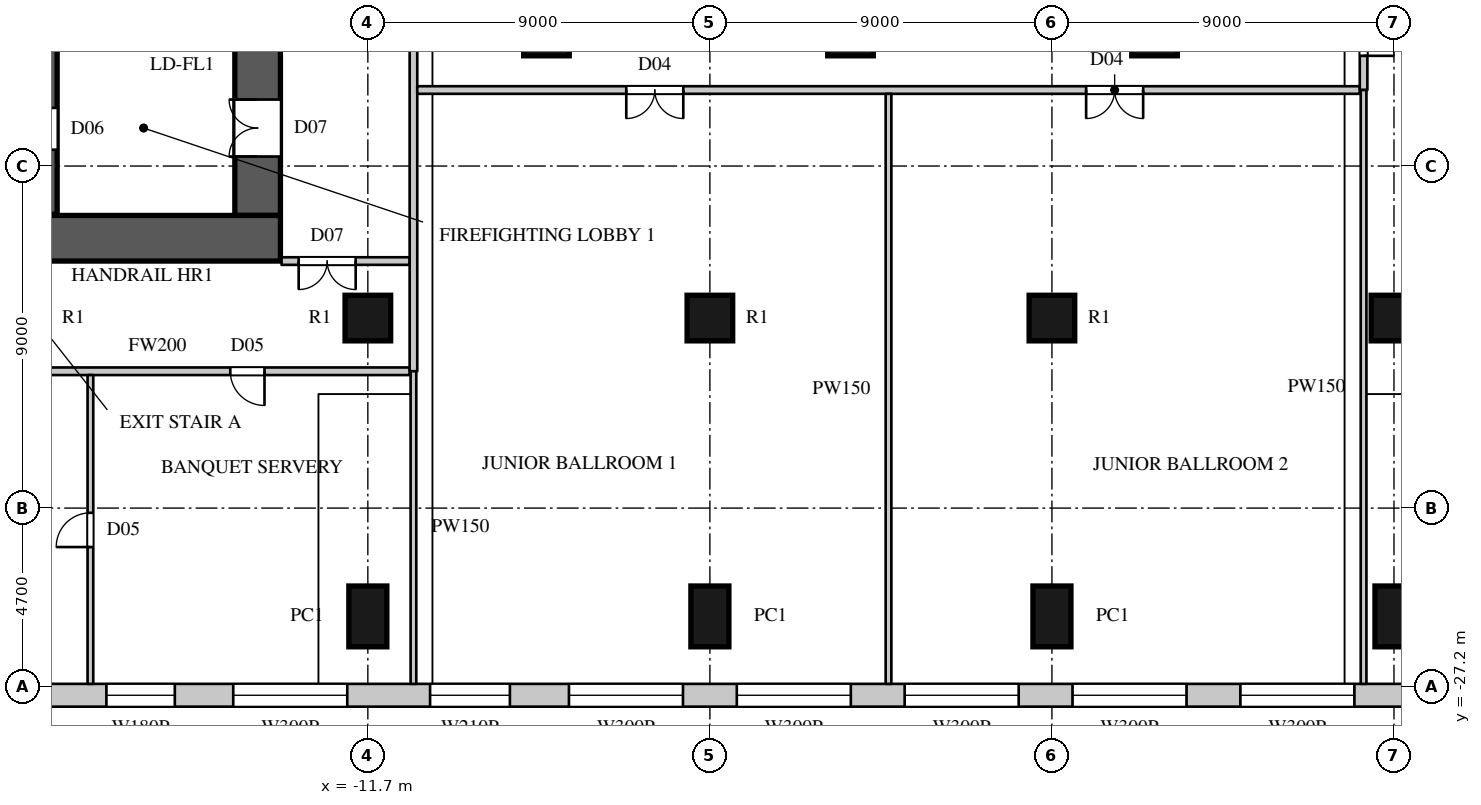
"""IFC4 building model, lengths in metres.
Left out: names, types, materials, properties, quantities, classifications, styles, units other than length and angle.
Written with IfcOpenShell. Run it as: python <this file> out.ifc"""

import sys

from ifc_helpers import new_model, si_unit, direction, frame, frame_2d, origin, origin_2d, place, context, subcontext, project, spatial, rectangle, circle, extrude, element, fill, save


model = new_model("IFC4")
c1 = context("Model", 3, precision=1e-05, world=origin(), true_north=direction((0.0, 1.0)))
c2 = subcontext(c1, "Body", "Model", "MODEL_VIEW")
j1 = project(units=[si_unit("LENGTHUNIT", "METRE"), si_unit("PLANEANGLEUNIT", "RADIAN")], contexts=[c1])
p1 = place(None, origin())
s1 = spatial("IfcSite", under=j1, at=p1, CompositionType="ELEMENT")
p2 = place(p1, origin())
s2 = spatial("IfcBuilding", under=s1, at=p2, CompositionType="ELEMENT")
p3 = place(p2, frame((0.0, 0.0, 36.0)))
s3 = spatial("IfcBuildingStorey", under=s2, at=p3, CompositionType="ELEMENT", Elevation=36.0)
for number, where, z_axis, x_axis in (
    (1, (-11.7, -25.35, 0.0), (0.0, 0.0, 1.0), (1.0, 0.0, 0.0)),
    (2, (-2.7, -25.35, 0.0), (0.0, 0.0, 1.0), (1.0, 0.0, 0.0)),
    (3, (6.3, -25.35, 0.0), (0.0, 0.0, 1.0), (1.0, 0.0, 0.0)),
    (4, (15.3, -25.35, 0.0), (0.0, 0.0, 1.0), (1.0, 0.0, 0.0)),
):
    element("IfcColumn", number, at=place(p3, frame(where, z_axis=z_axis, x_axis=x_axis)), inside=s3, PredefinedType="COLUMN", context=c2, shape_type="SweptSolid", body=[
        extrude(rectangle(XDim=1.0, YDim=1.6, at=origin_2d()), origin(), (0.0, 0.0, 1.0), 8.0),
    ])
for number, where, z_axis, x_axis in (
    (5, (-11.7, -17.5, 0.0), (0.0, 0.0, 1.0), (1.0, 0.0, 0.0)),
    (6, (-2.7, -17.5, 0.0), (0.0, 0.0, 1.0), (1.0, 0.0, 0.0)),
    (7, (6.3, -17.5, 0.0), (0.0, 0.0, 1.0), (1.0, 0.0, 0.0)),
    (8, (15.3, -17.5, 0.0), (0.0, 0.0, 1.0), (1.0, 0.0, 0.0)),
    (9, (-7.0, -10.0, 0.0), (0.0, 0.0, 1.0), (1.0, 0.0, 0.0)),
    (10, (1.0, -10.0, 0.0), (0.0, 0.0, 1.0), (1.0, 0.0, 0.0)),
    (11, (9.0, -10.0, 0.0), (0.0, 0.0, 1.0), (1.0, 0.0, 0.0)),
):
    element("IfcColumn", number, at=place(p3, frame(where, z_axis=z_axis, x_axis=x_axis)), inside=s3, PredefinedType="COLUMN", context=c2, shape_type="SweptSolid", body=[
        extrude(circle(Radius=0.6, at=origin_2d()), origin(), (0.0, 0.0, 1.0), 8.0),
    ])
p4 = place(p3, frame((-29.2, -27.425, 0.0), z_axis=(0.0, 0.0, 1.0), x_axis=(1.0, 0.0, 0.0)))
e12 = element("IfcWall", 12, at=p4, inside=s3, PredefinedType="ELEMENTEDWALL", context=c2, shape_type="SweptSolid", body=[
    extrude(rectangle(XDim=53.0, YDim=0.6, at=frame_2d((26.5, 0.0))), origin(), (0.0, 0.0, 1.0), 7.6),
])
p5 = place(p4, frame((0.708, 0.0, 1.5)))
e13 = element("IfcOpeningElement", 13, at=p5, cuts=e12, PredefinedType="OPENING", context=c2, shape_type="SweptSolid", body=[
    extrude(rectangle(XDim=3.0, YDim=2.4, at=frame_2d((1.5, 1.2))), frame((0.0, 0.31, 0.0), z_axis=(0.0, -1.0, 0.0), x_axis=(1.0, 0.0, 0.0)), (0.0, 0.0, 1.0), 0.62),
])
p6 = place(p4, frame((5.125, 0.0, 1.5)))
e14 = element("IfcOpeningElement", 14, at=p6, cuts=e12, PredefinedType="OPENING", context=c2, shape_type="SweptSolid", body=[
    extrude(rectangle(XDim=3.0, YDim=2.4, at=frame_2d((1.5, 1.2))), frame((0.0, 0.31, 0.0), z_axis=(0.0, -1.0, 0.0), x_axis=(1.0, 0.0, 0.0)), (0.0, 0.0, 1.0), 0.62),
])
p7 = place(p4, frame((13.958, 0.0, 1.5)))
e15 = element("IfcOpeningElement", 15, at=p7, cuts=e12, PredefinedType="OPENING", context=c2, shape_type="SweptSolid", body=[
    extrude(rectangle(XDim=3.0, YDim=2.4, at=frame_2d((1.5, 1.2))), frame((0.0, 0.31, 0.0), z_axis=(0.0, -1.0, 0.0), x_axis=(1.0, 0.0, 0.0)), (0.0, 0.0, 1.0), 0.62),
])
p8 = place(p4, frame((22.792, 0.0, 1.5)))
e16 = element("IfcOpeningElement", 16, at=p8, cuts=e12, PredefinedType="OPENING", context=c2, shape_type="SweptSolid", body=[
    extrude(rectangle(XDim=3.0, YDim=2.4, at=frame_2d((1.5, 1.2))), frame((0.0, 0.31, 0.0), z_axis=(0.0, -1.0, 0.0), x_axis=(1.0, 0.0, 0.0)), (0.0, 0.0, 1.0), 0.62),
])
p9 = place(p4, frame((27.208, 0.0, 1.5)))
e17 = element("IfcOpeningElement", 17, at=p9, cuts=e12, PredefinedType="OPENING", context=c2, shape_type="SweptSolid", body=[
    extrude(rectangle(XDim=3.0, YDim=2.4, at=frame_2d((1.5, 1.2))), frame((0.0, 0.31, 0.0), z_axis=(0.0, -1.0, 0.0), x_axis=(1.0, 0.0, 0.0)), (0.0, 0.0, 1.0), 0.62),
])
p10 = place(p4, frame((31.625, 0.0, 1.5)))
e18 = element("IfcOpeningElement", 18, at=p10, cuts=e12, PredefinedType="OPENING", context=c2, shape_type="SweptSolid", body=[
    extrude(rectangle(XDim=3.0, YDim=2.4, at=frame_2d((1.5, 1.2))), frame((0.0, 0.31, 0.0), z_axis=(0.0, -1.0, 0.0), x_axis=(1.0, 0.0, 0.0)), (0.0, 0.0, 1.0), 0.62),
])
p11 = place(p4, frame((36.042, 0.0, 1.5)))
e19 = element("IfcOpeningElement", 19, at=p11, cuts=e12, PredefinedType="OPENING", context=c2, shape_type="SweptSolid", body=[
    extrude(rectangle(XDim=3.0, YDim=2.4, at=frame_2d((1.5, 1.2))), frame((0.0, 0.31, 0.0), z_axis=(0.0, -1.0, 0.0), x_axis=(1.0, 0.0, 0.0)), (0.0, 0.0, 1.0), 0.62),
])
p12 = place(p4, frame((40.458, 0.0, 1.5)))
e20 = element("IfcOpeningElement", 20, at=p12, cuts=e12, PredefinedType="OPENING", context=c2, shape_type="SweptSolid", body=[
    extrude(rectangle(XDim=3.0, YDim=2.4, at=frame_2d((1.5, 1.2))), frame((0.0, 0.31, 0.0), z_axis=(0.0, -1.0, 0.0), x_axis=(1.0, 0.0, 0.0)), (0.0, 0.0, 1.0), 0.62),
])
p13 = place(p4, frame((44.875, 0.0, 1.5)))
e21 = element("IfcOpeningElement", 21, at=p13, cuts=e12, PredefinedType="OPENING", context=c2, shape_type="SweptSolid", body=[
    extrude(rectangle(XDim=3.0, YDim=2.4, at=frame_2d((1.5, 1.2))), frame((0.0, 0.31, 0.0), z_axis=(0.0, -1.0, 0.0), x_axis=(1.0, 0.0, 0.0)), (0.0, 0.0, 1.0), 0.62),
])
p14 = place(p4, frame((49.292, 0.0, 1.5)))
e22 = element("IfcOpeningElement", 22, at=p14, cuts=e12, PredefinedType="OPENING", context=c2, shape_type="SweptSolid", body=[
    extrude(rectangle(XDim=3.0, YDim=2.4, at=frame_2d((1.5, 1.2))), frame((0.0, 0.31, 0.0), z_axis=(0.0, -1.0, 0.0), x_axis=(1.0, 0.0, 0.0)), (0.0, 0.0, 1.0), 0.62),
])
p15 = place(p4, frame((10.621, 0.0, 1.5)))
e23 = element("IfcOpeningElement", 23, at=p15, cuts=e12, PredefinedType="OPENING", context=c2, shape_type="SweptSolid", body=[
    extrude(rectangle(XDim=1.8, YDim=2.4, at=frame_2d((0.9, 1.2))), frame((0.0, 0.31, 0.0), z_axis=(0.0, -1.0, 0.0), x_axis=(1.0, 0.0, 0.0)), (0.0, 0.0, 1.0), 0.62),
])
p16 = place(p4, frame((19.137, 0.0, 1.5)))
e24 = element("IfcOpeningElement", 24, at=p16, cuts=e12, PredefinedType="OPENING", context=c2, shape_type="SweptSolid", body=[
    extrude(rectangle(XDim=2.1, YDim=2.4, at=frame_2d((1.05, 1.2))), frame((0.0, 0.31, 0.0), z_axis=(0.0, -1.0, 0.0), x_axis=(1.0, 0.0, 0.0)), (0.0, 0.0, 1.0), 0.62),
])
p17 = place(p3, frame((-30.0, -15.4, 0.0), z_axis=(0.0, 0.0, 1.0), x_axis=(1.0, 0.0, 0.0)))
e25 = element("IfcWall", 25, at=p17, inside=s3, PredefinedType="SHEAR", context=c2, shape_type="SweptSolid", body=[
    extrude(rectangle(XDim=16.0, YDim=1.2, at=frame_2d((8.0, 0.0))), origin(), (0.0, 0.0, 1.0), 8.0),
])
p18 = place(p3, frame((-14.6, -14.8, 0.0), z_axis=(0.0, 0.0, 1.0), x_axis=(0.0, 1.0, 0.0)))
e26 = element("IfcWall", 26, at=p18, inside=s3, PredefinedType="SHEAR", context=c2, shape_type="SweptSolid", body=[
    extrude(rectangle(XDim=29.6, YDim=1.2, at=frame_2d((14.8, 0.0))), origin(), (0.0, 0.0, 1.0), 8.0),
])
p19 = place(p18, frame((1.55, 0.0, 0.0)))
e27 = element("IfcOpeningElement", 27, at=p19, cuts=e26, PredefinedType="OPENING", context=c2, shape_type="SweptSolid", body=[
    extrude(rectangle(XDim=1.5, YDim=2.4, at=frame_2d((0.75, 1.2))), frame((0.0, 0.61, 0.0), z_axis=(0.0, -1.0, 0.0), x_axis=(1.0, 0.0, 0.0)), (0.0, 0.0, 1.0), 1.22),
])
p20 = place(p18, frame((26.55, 0.0, 0.0)))
e28 = element("IfcOpeningElement", 28, at=p20, cuts=e26, PredefinedType="OPENING", context=c2, shape_type="SweptSolid", body=[
    extrude(rectangle(XDim=1.5, YDim=2.4, at=frame_2d((0.75, 1.2))), frame((0.0, 0.61, 0.0), z_axis=(0.0, -1.0, 0.0), x_axis=(1.0, 0.0, 0.0)), (0.0, 0.0, 1.0), 1.22),
])
p21 = place(p18, frame((8.45, 0.0, 0.0)))
e29 = element("IfcOpeningElement", 29, at=p21, cuts=e26, PredefinedType="OPENING", context=c2, shape_type="SweptSolid", body=[
    extrude(rectangle(XDim=1.5, YDim=2.4, at=frame_2d((0.75, 1.2))), frame((0.0, 0.61, 0.0), z_axis=(0.0, -1.0, 0.0), x_axis=(1.0, 0.0, 0.0)), (0.0, 0.0, 1.0), 1.22),
])
p22 = place(p18, frame((19.65, 0.0, 0.0)))
e30 = element("IfcOpeningElement", 30, at=p22, cuts=e26, PredefinedType="OPENING", context=c2, shape_type="SweptSolid", body=[
    extrude(rectangle(XDim=1.5, YDim=2.4, at=frame_2d((0.75, 1.2))), frame((0.0, 0.61, 0.0), z_axis=(0.0, -1.0, 0.0), x_axis=(1.0, 0.0, 0.0)), (0.0, 0.0, 1.0), 1.22),
])
p23 = place(p18, frame((14.5, 0.0, 0.0)))
e31 = element("IfcOpeningElement", 31, at=p23, cuts=e26, PredefinedType="OPENING", context=c2, shape_type="SweptSolid", body=[
    extrude(rectangle(XDim=0.6, YDim=2.0, at=frame_2d((0.3, 1.0))), frame((0.0, 0.61, 0.0), z_axis=(0.0, -1.0, 0.0), x_axis=(1.0, 0.0, 0.0)), (0.0, 0.0, 1.0), 1.22),
])
p24 = place(p3, frame((-23.869, -18.9, 0.0), z_axis=(0.0, 0.0, 1.0), x_axis=(1.0, 0.0, 0.0)))
e32 = element("IfcWall", 32, at=p24, inside=s3, PredefinedType="PARTITIONING", context=c2, shape_type="SweptSolid", body=[
    extrude(rectangle(XDim=13.269, YDim=0.2, at=frame_2d((6.635, 0.0))), origin(), (0.0, 0.0, 1.0), 7.598),
])
p25 = place(p24, frame((8.55, 0.0, 0.0)))
e33 = element("IfcOpeningElement", 33, at=p25, cuts=e32, PredefinedType="OPENING", context=c2, shape_type="SweptSolid", body=[
    extrude(rectangle(XDim=0.9, YDim=2.2, at=frame_2d((0.45, 1.1))), frame((0.0, 0.11, 0.0), z_axis=(0.0, -1.0, 0.0), x_axis=(1.0, 0.0, 0.0)), (0.0, 0.0, 1.0), 0.22),
])
p26 = place(p3, frame((-13.97, -16.0, 0.0), z_axis=(0.0, 0.0, 1.0), x_axis=(1.0, 0.0, 0.0)))
e34 = element("IfcWall", 34, at=p26, inside=s3, PredefinedType="PARTITIONING", context=c2, shape_type="SweptSolid", body=[
    extrude(rectangle(XDim=3.37, YDim=0.2, at=frame_2d((1.685, 0.0))), origin(), (0.0, 0.0, 1.0), 7.598),
])
p27 = place(p26, frame((0.45, 0.0, 0.0)))
e35 = element("IfcOpeningElement", 35, at=p27, cuts=e34, PredefinedType="OPENING", context=c2, shape_type="SweptSolid", body=[
    extrude(rectangle(XDim=1.5, YDim=2.4, at=frame_2d((0.75, 1.2))), frame((0.0, 0.11, 0.0), z_axis=(0.0, -1.0, 0.0), x_axis=(1.0, 0.0, 0.0)), (0.0, 0.0, 1.0), 0.22),
])
p28 = place(p3, frame((-10.5, -18.9, 0.0), z_axis=(0.0, 0.0, 1.0), x_axis=(0.0, 1.0, 0.0)))
e36 = element("IfcWall", 36, at=p28, inside=s3, PredefinedType="PARTITIONING", context=c2, shape_type="SweptSolid", body=[
    extrude(rectangle(XDim=37.8, YDim=0.2, at=frame_2d((18.9, 0.0))), origin(), (0.0, 0.0, 1.0), 7.598),
])
p29 = place(p28, frame((18.15, 0.0, 0.0)))
e37 = element("IfcOpeningElement", 37, at=p29, cuts=e36, PredefinedType="OPENING", context=c2, shape_type="SweptSolid", body=[
    extrude(rectangle(XDim=1.5, YDim=2.4, at=frame_2d((0.75, 1.2))), frame((0.0, 0.11, 0.0), z_axis=(0.0, -1.0, 0.0), x_axis=(1.0, 0.0, 0.0)), (0.0, 0.0, 1.0), 0.22),
])
p30 = place(p3, frame((-10.4, -11.5, 0.0), z_axis=(0.0, 0.0, 1.0), x_axis=(1.0, 0.0, 0.0)))
e38 = element("IfcWall", 38, at=p30, inside=s3, PredefinedType="PARTITIONING", context=c2, shape_type="SweptSolid", body=[
    extrude(rectangle(XDim=24.8, YDim=0.2, at=frame_2d((12.4, 0.0))), origin(), (0.0, 0.0, 1.0), 7.598),
])
p31 = place(p30, frame((5.5, 0.0, 0.0)))
e39 = element("IfcOpeningElement", 39, at=p31, cuts=e38, PredefinedType="OPENING", context=c2, shape_type="SweptSolid", body=[
    extrude(rectangle(XDim=1.5, YDim=2.2, at=frame_2d((0.75, 1.1))), frame((0.0, 0.11, 0.0), z_axis=(0.0, -1.0, 0.0), x_axis=(1.0, 0.0, 0.0)), (0.0, 0.0, 1.0), 0.22),
])
p32 = place(p30, frame((17.6, 0.0, 0.0)))
e40 = element("IfcOpeningElement", 40, at=p32, cuts=e38, PredefinedType="OPENING", context=c2, shape_type="SweptSolid", body=[
    extrude(rectangle(XDim=1.5, YDim=2.2, at=frame_2d((0.75, 1.1))), frame((0.0, 0.11, 0.0), z_axis=(0.0, -1.0, 0.0), x_axis=(1.0, 0.0, 0.0)), (0.0, 0.0, 1.0), 0.22),
])
p33 = place(p3, frame((14.5, -11.5, 0.0), z_axis=(0.0, 0.0, 1.0), x_axis=(0.0, 1.0, 0.0)))
e41 = element("IfcWall", 41, at=p33, inside=s3, PredefinedType="PARTITIONING", context=c2, shape_type="SweptSolid", body=[
    extrude(rectangle(XDim=3.4, YDim=0.2, at=frame_2d((1.7, 0.0))), origin(), (0.0, 0.0, 1.0), 7.598),
])
p34 = place(p33, frame((0.9, 0.0, 0.0)))
e42 = element("IfcOpeningElement", 42, at=p34, cuts=e41, PredefinedType="OPENING", context=c2, shape_type="SweptSolid", body=[
    extrude(rectangle(XDim=1.6, YDim=2.4, at=frame_2d((0.8, 1.2))), frame((0.0, 0.11, 0.0), z_axis=(0.0, -1.0, 0.0), x_axis=(1.0, 0.0, 0.0)), (0.0, 0.0, 1.0), 0.22),
])
p35 = place(p3, frame((-19.0, -27.125, 0.0), z_axis=(0.0, 0.0, 1.0), x_axis=(0.0, 1.0, 0.0)))
e43 = element("IfcWall", 43, at=p35, inside=s3, PredefinedType="PARTITIONING", context=c2, shape_type="SweptSolid", body=[
    extrude(rectangle(XDim=8.125, YDim=0.15, at=frame_2d((4.062, 0.0))), origin(), (0.0, 0.0, 1.0), 7.598),
])
p36 = place(p35, frame((3.6, 0.0, 0.0)))
e44 = element("IfcOpeningElement", 44, at=p36, cuts=e43, PredefinedType="OPENING", context=c2, shape_type="SweptSolid", body=[
    extrude(rectangle(XDim=0.9, YDim=2.2, at=frame_2d((0.45, 1.1))), frame((0.0, 0.085, 0.0), z_axis=(0.0, -1.0, 0.0), x_axis=(1.0, 0.0, 0.0)), (0.0, 0.0, 1.0), 0.17),
])
p37 = place(p3, frame((-10.5, -27.125, 0.0), z_axis=(0.0, 0.0, 1.0), x_axis=(0.0, 1.0, 0.0)))
e45 = element("IfcWall", 45, at=p37, inside=s3, PredefinedType="PARTITIONING", context=c2, shape_type="SweptSolid", body=[
    extrude(rectangle(XDim=8.225, YDim=0.15, at=frame_2d((4.113, 0.0))), origin(), (0.0, 0.0, 1.0), 7.598),
])
p38 = place(p3, frame((2.0, -27.125, 0.0), z_axis=(0.0, 0.0, 1.0), x_axis=(0.0, 1.0, 0.0)))
e46 = element("IfcWall", 46, at=p38, inside=s3, PredefinedType="PARTITIONING", context=c2, shape_type="SweptSolid", body=[
    extrude(rectangle(XDim=15.525, YDim=0.15, at=frame_2d((7.762, 0.0))), origin(), (0.0, 0.0, 1.0), 7.598),
])
p39 = place(p3, frame((14.5, -27.125, 0.0), z_axis=(0.0, 0.0, 1.0), x_axis=(0.0, 1.0, 0.0)))
e47 = element("IfcWall", 47, at=p39, inside=s3, PredefinedType="PARTITIONING", context=c2, shape_type="SweptSolid", body=[
    extrude(rectangle(XDim=15.625, YDim=0.15, at=frame_2d((7.812, 0.0))), origin(), (0.0, 0.0, 1.0), 7.598),
])
p40 = place(p3, frame((-20.0, -14.77, 0.0), z_axis=(0.0, 0.0, 1.0), x_axis=(0.0, 1.0, 0.0)))
e48 = element("IfcWall", 48, at=p40, inside=s3, PredefinedType="SHEAR", context=c2, shape_type="SweptSolid", body=[
    extrude(rectangle(XDim=4.445, YDim=0.25, at=frame_2d((2.223, 0.0))), origin(), (0.0, 0.0, 1.0), 7.598),
])
p41 = place(p40, frame((1.7, 0.0, 0.0)))
e49 = element("IfcOpeningElement", 49, at=p41, cuts=e48, PredefinedType="OPENING", context=c2, shape_type="SweptSolid", body=[
    extrude(rectangle(XDim=1.1, YDim=2.2, at=frame_2d((0.55, 1.1))), frame((0.0, 0.135, 0.0), z_axis=(0.0, -1.0, 0.0), x_axis=(1.0, 0.0, 0.0)), (0.0, 0.0, 1.0), 0.27),
])
p42 = place(p7, origin())
e50 = element("IfcWindow", 50, at=p42, inside=s3, PartitioningType="SINGLE_PANEL", PredefinedType="WINDOW", context=c2, shape_type="SweptSolid", body=[
    extrude(rectangle(XDim=3.0, YDim=2.4, at=frame_2d((1.5, 1.2))), frame((0.0, 0.06, 0.0), z_axis=(0.0, -1.0, 0.0), x_axis=(1.0, 0.0, 0.0)), (0.0, 0.0, 1.0), 0.06),
])
fill(e15, e50)
p43 = place(p8, origin())
e51 = element("IfcWindow", 51, at=p43, inside=s3, PartitioningType="SINGLE_PANEL", PredefinedType="WINDOW", context=c2, shape_type="SweptSolid", body=[
    extrude(rectangle(XDim=3.0, YDim=2.4, at=frame_2d((1.5, 1.2))), frame((0.0, 0.06, 0.0), z_axis=(0.0, -1.0, 0.0), x_axis=(1.0, 0.0, 0.0)), (0.0, 0.0, 1.0), 0.06),
])
fill(e16, e51)
p44 = place(p9, origin())
e52 = element("IfcWindow", 52, at=p44, inside=s3, PartitioningType="SINGLE_PANEL", PredefinedType="WINDOW", context=c2, shape_type="SweptSolid", body=[
    extrude(rectangle(XDim=3.0, YDim=2.4, at=frame_2d((1.5, 1.2))), frame((0.0, 0.06, 0.0), z_axis=(0.0, -1.0, 0.0), x_axis=(1.0, 0.0, 0.0)), (0.0, 0.0, 1.0), 0.06),
])
fill(e17, e52)
p45 = place(p10, origin())
e53 = element("IfcWindow", 53, at=p45, inside=s3, PartitioningType="SINGLE_PANEL", PredefinedType="WINDOW", context=c2, shape_type="SweptSolid", body=[
    extrude(rectangle(XDim=3.0, YDim=2.4, at=frame_2d((1.5, 1.2))), frame((0.0, 0.06, 0.0), z_axis=(0.0, -1.0, 0.0), x_axis=(1.0, 0.0, 0.0)), (0.0, 0.0, 1.0), 0.06),
])
fill(e18, e53)
p46 = place(p11, origin())
e54 = element("IfcWindow", 54, at=p46, inside=s3, PartitioningType="SINGLE_PANEL", PredefinedType="WINDOW", context=c2, shape_type="SweptSolid", body=[
    extrude(rectangle(XDim=3.0, YDim=2.4, at=frame_2d((1.5, 1.2))), frame((0.0, 0.06, 0.0), z_axis=(0.0, -1.0, 0.0), x_axis=(1.0, 0.0, 0.0)), (0.0, 0.0, 1.0), 0.06),
])
fill(e19, e54)
p47 = place(p12, origin())
e55 = element("IfcWindow", 55, at=p47, inside=s3, PartitioningType="SINGLE_PANEL", PredefinedType="WINDOW", context=c2, shape_type="SweptSolid", body=[
    extrude(rectangle(XDim=3.0, YDim=2.4, at=frame_2d((1.5, 1.2))), frame((0.0, 0.06, 0.0), z_axis=(0.0, -1.0, 0.0), x_axis=(1.0, 0.0, 0.0)), (0.0, 0.0, 1.0), 0.06),
])
fill(e20, e55)
p48 = place(p41, origin())
e56 = element("IfcDoor", 56, at=p48, inside=s3, OperationType="SINGLE_SWING_RIGHT", PredefinedType="DOOR", context=c2, shape_type="SweptSolid", body=[
    extrude(rectangle(XDim=1.1, YDim=2.2, at=frame_2d((0.55, 1.1))), frame((0.0, 0.025, 0.0), z_axis=(0.0, -1.0, 0.0), x_axis=(1.0, 0.0, 0.0)), (0.0, 0.0, 1.0), 0.05),
])
fill(e49, e56)
p49 = place(p27, origin())
e57 = element("IfcDoor", 57, at=p49, inside=s3, OperationType="DOUBLE_DOOR_SINGLE_SWING", PredefinedType="DOOR", context=c2, shape_type="SweptSolid", body=[
    extrude(rectangle(XDim=1.5, YDim=2.4, at=frame_2d((0.75, 1.2))), frame((0.0, 0.025, 0.0), z_axis=(0.0, -1.0, 0.0), x_axis=(1.0, 0.0, 0.0)), (0.0, 0.0, 1.0), 0.05),
])
fill(e35, e57)
p50 = place(p25, origin())
e58 = element("IfcDoor", 58, at=p50, inside=s3, OperationType="SINGLE_SWING_LEFT", PredefinedType="DOOR", context=c2, shape_type="SweptSolid", body=[
    extrude(rectangle(XDim=0.9, YDim=2.2, at=frame_2d((0.45, 1.1))), frame((0.0, 0.025, 0.0), z_axis=(0.0, -1.0, 0.0), x_axis=(1.0, 0.0, 0.0)), (0.0, 0.0, 1.0), 0.05),
])
fill(e33, e58)
p51 = place(p36, origin())
e59 = element("IfcDoor", 59, at=p51, inside=s3, OperationType="SINGLE_SWING_LEFT", PredefinedType="DOOR", context=c2, shape_type="SweptSolid", body=[
    extrude(rectangle(XDim=0.9, YDim=2.2, at=frame_2d((0.45, 1.1))), frame((0.0, 0.025, 0.0), z_axis=(0.0, -1.0, 0.0), x_axis=(1.0, 0.0, 0.0)), (0.0, 0.0, 1.0), 0.05),
])
fill(e44, e59)
p52 = place(p31, origin())
e60 = element("IfcDoor", 60, at=p52, inside=s3, OperationType="DOUBLE_DOOR_SINGLE_SWING", PredefinedType="DOOR", context=c2, shape_type="SweptSolid", body=[
    extrude(rectangle(XDim=1.5, YDim=2.2, at=frame_2d((0.75, 1.1))), frame((0.0, 0.025, 0.0), z_axis=(0.0, -1.0, 0.0), x_axis=(1.0, 0.0, 0.0)), (0.0, 0.0, 1.0), 0.05),
])
fill(e39, e60)
p53 = place(p32, origin())
e61 = element("IfcDoor", 61, at=p53, inside=s3, OperationType="DOUBLE_DOOR_SINGLE_SWING", PredefinedType="DOOR", context=c2, shape_type="SweptSolid", body=[
    extrude(rectangle(XDim=1.5, YDim=2.2, at=frame_2d((0.75, 1.1))), frame((0.0, 0.025, 0.0), z_axis=(0.0, -1.0, 0.0), x_axis=(1.0, 0.0, 0.0)), (0.0, 0.0, 1.0), 0.05),
])
fill(e40, e61)
p54 = place(p34, origin())
e62 = element("IfcDoor", 62, at=p54, inside=s3, OperationType="DOUBLE_DOOR_SINGLE_SWING", PredefinedType="DOOR", context=c2, shape_type="SweptSolid", body=[
    extrude(rectangle(XDim=1.6, YDim=2.4, at=frame_2d((0.8, 1.2))), frame((0.0, 0.025, 0.0), z_axis=(0.0, -1.0, 0.0), x_axis=(1.0, 0.0, 0.0)), (0.0, 0.0, 1.0), 0.05),
])
fill(e42, e62)
p55 = place(p19, origin())
e63 = element("IfcDoor", 63, at=p55, inside=s3, OperationType="DOUBLE_DOOR_SINGLE_SWING", PredefinedType="DOOR", context=c2, shape_type="SweptSolid", body=[
    extrude(rectangle(XDim=1.5, YDim=2.4, at=frame_2d((0.75, 1.2))), frame((0.0, 0.025, 0.0), z_axis=(0.0, -1.0, 0.0), x_axis=(1.0, 0.0, 0.0)), (0.0, 0.0, 1.0), 0.05),
])
fill(e27, e63)
p56 = place(p15, origin())
e64 = element("IfcWindow", 64, at=p56, inside=s3, PartitioningType="SINGLE_PANEL", PredefinedType="WINDOW", context=c2, shape_type="SweptSolid", body=[
    extrude(rectangle(XDim=1.8, YDim=2.4, at=frame_2d((0.9, 1.2))), frame((0.0, 0.06, 0.0), z_axis=(0.0, -1.0, 0.0), x_axis=(1.0, 0.0, 0.0)), (0.0, 0.0, 1.0), 0.06),
])
fill(e23, e64)
p57 = place(p16, origin())
e65 = element("IfcWindow", 65, at=p57, inside=s3, PartitioningType="SINGLE_PANEL", PredefinedType="WINDOW", context=c2, shape_type="SweptSolid", body=[
    extrude(rectangle(XDim=2.1, YDim=2.4, at=frame_2d((1.05, 1.2))), frame((0.0, 0.06, 0.0), z_axis=(0.0, -1.0, 0.0), x_axis=(1.0, 0.0, 0.0)), (0.0, 0.0, 1.0), 0.06),
])
fill(e24, e65)
save(model, sys.argv[1])
